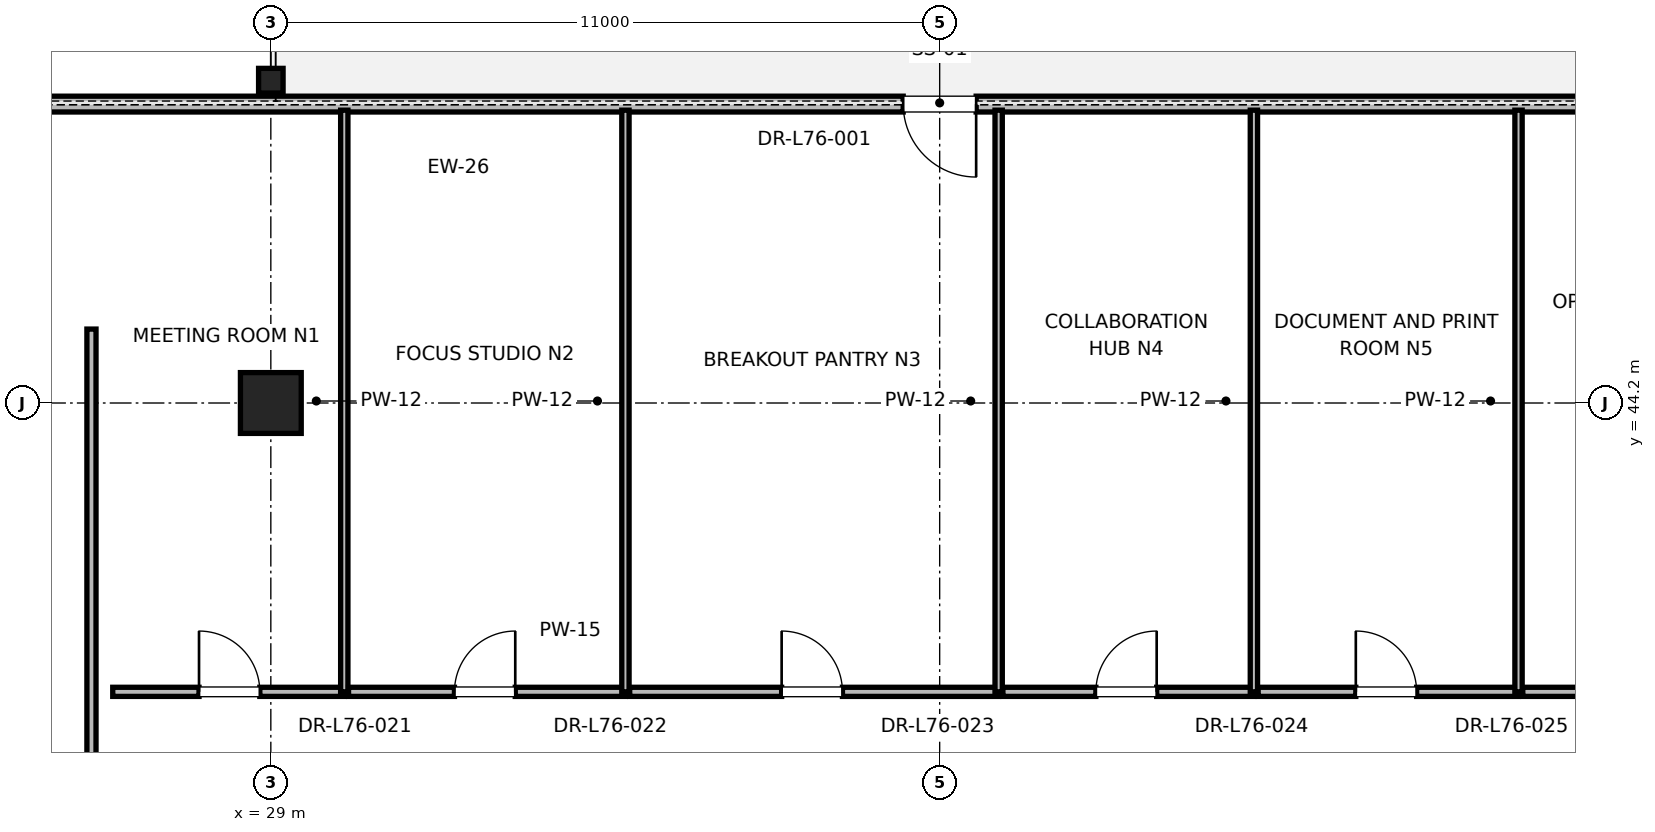
"""IFC4 building model, lengths in metres.
Left out: names, types, materials, properties, quantities, classifications, styles, units other than length and angle.
Written with IfcOpenShell. Run it as: python <this file> out.ifc"""

import sys

from ifc_helpers import new_model, si_unit, direction, frame, frame_2d, origin, origin_2d, place, context, subcontext, project, spatial, rectangle, i_section, extrude, element, fill, save


model = new_model("IFC4")
c1 = context("Model", 3, precision=1e-05, world=origin(), true_north=direction((0.0, 1.0)))
c2 = subcontext(c1, "Body", "Model", "MODEL_VIEW")
j1 = project(units=[si_unit("LENGTHUNIT", "METRE"), si_unit("PLANEANGLEUNIT", "RADIAN")], contexts=[c1])
p1 = place(None, origin())
s1 = spatial("IfcSite", under=j1, at=p1, CompositionType="ELEMENT")
p2 = place(p1, origin())
s2 = spatial("IfcBuilding", under=s1, at=p2, CompositionType="ELEMENT")
p3 = place(p2, frame((0.0, 0.0, 326.8)))
s3 = spatial("IfcBuildingStorey", under=s2, at=p3, CompositionType="ELEMENT", Elevation=326.8)
p4 = place(p3, frame((29.0, 44.2, 0.0), z_axis=(0.0, 0.0, 1.0), x_axis=(1.0, 0.0, 0.0)))
e1 = element("IfcColumn", 1, at=p4, inside=s3, PredefinedType="COLUMN", context=c2, shape_type="SweptSolid", body=[
    extrude(rectangle(XDim=1.0, YDim=1.0, at=origin_2d()), origin(), (0.0, 0.0, 1.0), 4.0),
])
p5 = place(p3, frame((29.0, 49.5, 0.0), z_axis=(0.0, 0.0, 1.0), x_axis=(1.0, 0.0, 0.0)))
e2 = element("IfcColumn", 2, at=p5, inside=s3, PredefinedType="COLUMN", context=c2, shape_type="SweptSolid", body=[
    extrude(i_section(OverallWidth=0.403, OverallDepth=0.406, WebThickness=0.027, FlangeThickness=0.043, FilletRadius=0.015, at=origin_2d()), origin(), (0.0, 0.0, 1.0), 4.0),
])
p6 = place(p3, frame((61.031, 49.116, 0.0), z_axis=(0.0, 0.0, 1.0), x_axis=(-1.0, 0.0, 0.0)))
e3 = element("IfcWall", 3, at=p6, inside=s3, PredefinedType="PARAPET", context=c2, shape_type="SweptSolid", body=[
    extrude(rectangle(XDim=42.063, YDim=0.26, at=frame_2d((21.031, 0.0))), origin(), (0.0, 0.0, 1.0), 3.196),
])
p7 = place(p6, frame((4.2, 0.0, 0.85)))
e4 = element("IfcOpeningElement", 4, at=p7, cuts=e3, PredefinedType="OPENING", context=c2, shape_type="SweptSolid", body=[
    extrude(rectangle(XDim=1.6, YDim=2.1, at=frame_2d((0.8, 1.05))), frame((0.0, 0.13, 0.0), z_axis=(0.0, -1.0, 0.0), x_axis=(1.0, 0.0, 0.0)), (0.0, 0.0, 1.0), 0.26),
])
p8 = place(p6, frame((20.431, 0.0, 0.0)))
e5 = element("IfcOpeningElement", 5, at=p8, cuts=e3, PredefinedType="OPENING", context=c2, shape_type="SweptSolid", body=[
    extrude(rectangle(XDim=1.2, YDim=2.2, at=frame_2d((0.6, 1.1))), frame((0.0, 0.13, 0.0), z_axis=(0.0, -1.0, 0.0), x_axis=(1.0, 0.0, 0.0)), (0.0, 0.0, 1.0), 0.26),
])
p9 = place(p6, frame((36.263, 0.0, 0.85)))
e6 = element("IfcOpeningElement", 6, at=p9, cuts=e3, PredefinedType="OPENING", context=c2, shape_type="SweptSolid", body=[
    extrude(rectangle(XDim=1.6, YDim=2.1, at=frame_2d((0.8, 1.05))), frame((0.0, 0.13, 0.0), z_axis=(0.0, -1.0, 0.0), x_axis=(1.0, 0.0, 0.0)), (0.0, 0.0, 1.0), 0.26),
])
p10 = place(p3, frame((26.4, 39.45, 0.0), z_axis=(0.0, 0.0, 1.0), x_axis=(1.0, 0.0, 0.0)))
e7 = element("IfcWall", 7, at=p10, inside=s3, PredefinedType="PARTITIONING", context=c2, shape_type="SweptSolid", body=[
    extrude(rectangle(XDim=3.808, YDim=0.15, at=frame_2d((1.904, 0.0))), origin(), (0.0, 0.0, 1.0), 2.85),
])
p11 = place(p10, frame((1.419, 0.0, 0.0)))
e8 = element("IfcOpeningElement", 8, at=p11, cuts=e7, PredefinedType="OPENING", context=c2, shape_type="SweptSolid", body=[
    extrude(rectangle(XDim=1.0, YDim=2.15, at=frame_2d((0.5, 1.075))), frame((0.0, 0.075, 0.0), z_axis=(0.0, -1.0, 0.0), x_axis=(1.0, 0.0, 0.0)), (0.0, 0.0, 1.0), 0.15),
])
p12 = place(p3, frame((30.208, 39.45, 0.0), z_axis=(0.0, 0.0, 1.0), x_axis=(0.0, 1.0, 0.0)))
e9 = element("IfcWall", 9, at=p12, inside=s3, PredefinedType="PARTITIONING", context=c2, shape_type="SweptSolid", body=[
    extrude(rectangle(XDim=9.566, YDim=0.12, at=frame_2d((4.783, 0.0))), origin(), (0.0, 0.0, 1.0), 2.415),
])
p13 = place(p3, frame((30.278, 39.45, 0.0), z_axis=(0.0, 0.0, 1.0), x_axis=(1.0, 0.0, 0.0)))
e10 = element("IfcWall", 10, at=p13, inside=s3, PredefinedType="PARTITIONING", context=c2, shape_type="SweptSolid", body=[
    extrude(rectangle(XDim=4.554, YDim=0.15, at=frame_2d((2.277, 0.0))), origin(), (0.0, 0.0, 1.0), 2.85),
])
p14 = place(p13, frame((1.742, 0.0, 0.0)))
e11 = element("IfcOpeningElement", 11, at=p14, cuts=e10, PredefinedType="OPENING", context=c2, shape_type="SweptSolid", body=[
    extrude(rectangle(XDim=1.0, YDim=2.15, at=frame_2d((0.5, 1.075))), frame((0.0, 0.075, 0.0), z_axis=(0.0, -1.0, 0.0), x_axis=(1.0, 0.0, 0.0)), (0.0, 0.0, 1.0), 0.15),
])
p15 = place(p3, frame((34.832, 39.45, 0.0), z_axis=(0.0, 0.0, 1.0), x_axis=(0.0, 1.0, 0.0)))
e12 = element("IfcWall", 12, at=p15, inside=s3, PredefinedType="PARTITIONING", context=c2, shape_type="SweptSolid", body=[
    extrude(rectangle(XDim=9.566, YDim=0.12, at=frame_2d((4.783, 0.0))), origin(), (0.0, 0.0, 1.0), 2.415),
])
p16 = place(p3, frame((34.902, 39.45, 0.0), z_axis=(0.0, 0.0, 1.0), x_axis=(1.0, 0.0, 0.0)))
e13 = element("IfcWall", 13, at=p16, inside=s3, PredefinedType="PARTITIONING", context=c2, shape_type="SweptSolid", body=[
    extrude(rectangle(XDim=6.068, YDim=0.15, at=frame_2d((3.034, 0.0))), origin(), (0.0, 0.0, 1.0), 2.85),
])
p17 = place(p16, frame((2.499, 0.0, 0.0)))
e14 = element("IfcOpeningElement", 14, at=p17, cuts=e13, PredefinedType="OPENING", context=c2, shape_type="SweptSolid", body=[
    extrude(rectangle(XDim=1.0, YDim=2.15, at=frame_2d((0.5, 1.075))), frame((0.0, 0.075, 0.0), z_axis=(0.0, -1.0, 0.0), x_axis=(1.0, 0.0, 0.0)), (0.0, 0.0, 1.0), 0.15),
])
p18 = place(p3, frame((40.97, 39.45, 0.0), z_axis=(0.0, 0.0, 1.0), x_axis=(0.0, 1.0, 0.0)))
e15 = element("IfcWall", 15, at=p18, inside=s3, PredefinedType="PARTITIONING", context=c2, shape_type="SweptSolid", body=[
    extrude(rectangle(XDim=9.566, YDim=0.12, at=frame_2d((4.783, 0.0))), origin(), (0.0, 0.0, 1.0), 2.415),
])
p19 = place(p3, frame((41.04, 39.45, 0.0), z_axis=(0.0, 0.0, 1.0), x_axis=(1.0, 0.0, 0.0)))
e16 = element("IfcWall", 16, at=p19, inside=s3, PredefinedType="PARTITIONING", context=c2, shape_type="SweptSolid", body=[
    extrude(rectangle(XDim=4.128, YDim=0.15, at=frame_2d((2.064, 0.0))), origin(), (0.0, 0.0, 1.0), 2.85),
])
p20 = place(p19, frame((1.529, 0.0, 0.0)))
e17 = element("IfcOpeningElement", 17, at=p20, cuts=e16, PredefinedType="OPENING", context=c2, shape_type="SweptSolid", body=[
    extrude(rectangle(XDim=1.0, YDim=2.15, at=frame_2d((0.5, 1.075))), frame((0.0, 0.075, 0.0), z_axis=(0.0, -1.0, 0.0), x_axis=(1.0, 0.0, 0.0)), (0.0, 0.0, 1.0), 0.15),
])
p21 = place(p3, frame((45.168, 39.45, 0.0), z_axis=(0.0, 0.0, 1.0), x_axis=(0.0, 1.0, 0.0)))
e18 = element("IfcWall", 18, at=p21, inside=s3, PredefinedType="PARTITIONING", context=c2, shape_type="SweptSolid", body=[
    extrude(rectangle(XDim=9.566, YDim=0.12, at=frame_2d((4.783, 0.0))), origin(), (0.0, 0.0, 1.0), 2.415),
])
p22 = place(p3, frame((45.238, 39.45, 0.0), z_axis=(0.0, 0.0, 1.0), x_axis=(1.0, 0.0, 0.0)))
e19 = element("IfcWall", 19, at=p22, inside=s3, PredefinedType="PARTITIONING", context=c2, shape_type="SweptSolid", body=[
    extrude(rectangle(XDim=4.282, YDim=0.15, at=frame_2d((2.141, 0.0))), origin(), (0.0, 0.0, 1.0), 2.85),
])
p23 = place(p22, frame((1.606, 0.0, 0.0)))
e20 = element("IfcOpeningElement", 20, at=p23, cuts=e19, PredefinedType="OPENING", context=c2, shape_type="SweptSolid", body=[
    extrude(rectangle(XDim=1.0, YDim=2.15, at=frame_2d((0.5, 1.075))), frame((0.0, 0.075, 0.0), z_axis=(0.0, -1.0, 0.0), x_axis=(1.0, 0.0, 0.0)), (0.0, 0.0, 1.0), 0.15),
])
p24 = place(p3, frame((49.52, 39.45, 0.0), z_axis=(0.0, 0.0, 1.0), x_axis=(0.0, 1.0, 0.0)))
e21 = element("IfcWall", 21, at=p24, inside=s3, PredefinedType="PARTITIONING", context=c2, shape_type="SweptSolid", body=[
    extrude(rectangle(XDim=9.566, YDim=0.12, at=frame_2d((4.783, 0.0))), origin(), (0.0, 0.0, 1.0), 2.415),
])
p25 = place(p3, frame((49.59, 39.45, 0.0), z_axis=(0.0, 0.0, 1.0), x_axis=(1.0, 0.0, 0.0)))
e22 = element("IfcWall", 22, at=p25, inside=s3, PredefinedType="PARTITIONING", context=c2, shape_type="SweptSolid", body=[
    extrude(rectangle(XDim=4.01, YDim=0.15, at=frame_2d((2.005, 0.0))), origin(), (0.0, 0.0, 1.0), 2.85),
])
p26 = place(p25, frame((1.455, 0.0, 0.0)))
e23 = element("IfcOpeningElement", 23, at=p26, cuts=e22, PredefinedType="OPENING", context=c2, shape_type="SweptSolid", body=[
    extrude(rectangle(XDim=1.0, YDim=2.15, at=frame_2d((0.5, 1.075))), frame((0.0, 0.075, 0.0), z_axis=(0.0, -1.0, 0.0), x_axis=(1.0, 0.0, 0.0)), (0.0, 0.0, 1.0), 0.15),
])
p27 = place(p3, frame((26.05, 34.736, 0.0), z_axis=(0.0, 0.0, 1.0), x_axis=(0.0, 1.0, 0.0)))
e24 = element("IfcWall", 24, at=p27, inside=s3, PredefinedType="PARTITIONING", context=c2, shape_type="SweptSolid", body=[
    extrude(rectangle(XDim=10.679, YDim=0.15, at=frame_2d((5.34, 0.0))), origin(), (0.0, 0.0, 1.0), 2.85),
])
p28 = place(p27, frame((0.332, 0.0, 0.0)))
e25 = element("IfcOpeningElement", 25, at=p28, cuts=e24, PredefinedType="OPENING", context=c2, shape_type="SweptSolid", body=[
    extrude(rectangle(XDim=1.0, YDim=2.15, at=frame_2d((0.5, 1.075))), frame((0.0, 0.075, 0.0), z_axis=(0.0, -1.0, 0.0), x_axis=(1.0, 0.0, 0.0)), (0.0, 0.0, 1.0), 0.15),
])
p29 = place(p8, origin())
e26 = element("IfcDoor", 26, at=p29, inside=s3, OperationType="SINGLE_SWING_LEFT", PredefinedType="DOOR", context=c2, shape_type="SweptSolid", body=[
    extrude(rectangle(XDim=1.2, YDim=2.2, at=frame_2d((0.6, 1.1))), frame((0.0, 0.025, 0.0), z_axis=(0.0, -1.0, 0.0), x_axis=(1.0, 0.0, 0.0)), (0.0, 0.0, 1.0), 0.05),
])
fill(e5, e26)
p30 = place(p11, origin())
e27 = element("IfcDoor", 27, at=p30, inside=s3, OperationType="SINGLE_SWING_LEFT", PredefinedType="DOOR", context=c2, shape_type="SweptSolid", body=[
    extrude(rectangle(XDim=1.0, YDim=2.15, at=frame_2d((0.5, 1.075))), frame((0.0, 0.025, 0.0), z_axis=(0.0, -1.0, 0.0), x_axis=(1.0, 0.0, 0.0)), (0.0, 0.0, 1.0), 0.05),
])
fill(e8, e27)
p31 = place(p14, origin())
e28 = element("IfcDoor", 28, at=p31, inside=s3, OperationType="SINGLE_SWING_RIGHT", PredefinedType="DOOR", context=c2, shape_type="SweptSolid", body=[
    extrude(rectangle(XDim=1.0, YDim=2.15, at=frame_2d((0.5, 1.075))), frame((0.0, 0.025, 0.0), z_axis=(0.0, -1.0, 0.0), x_axis=(1.0, 0.0, 0.0)), (0.0, 0.0, 1.0), 0.05),
])
fill(e11, e28)
p32 = place(p17, origin())
e29 = element("IfcDoor", 29, at=p32, inside=s3, OperationType="SINGLE_SWING_LEFT", PredefinedType="DOOR", context=c2, shape_type="SweptSolid", body=[
    extrude(rectangle(XDim=1.0, YDim=2.15, at=frame_2d((0.5, 1.075))), frame((0.0, 0.025, 0.0), z_axis=(0.0, -1.0, 0.0), x_axis=(1.0, 0.0, 0.0)), (0.0, 0.0, 1.0), 0.05),
])
fill(e14, e29)
p33 = place(p20, origin())
e30 = element("IfcDoor", 30, at=p33, inside=s3, OperationType="SINGLE_SWING_RIGHT", PredefinedType="DOOR", context=c2, shape_type="SweptSolid", body=[
    extrude(rectangle(XDim=1.0, YDim=2.15, at=frame_2d((0.5, 1.075))), frame((0.0, 0.025, 0.0), z_axis=(0.0, -1.0, 0.0), x_axis=(1.0, 0.0, 0.0)), (0.0, 0.0, 1.0), 0.05),
])
fill(e17, e30)
p34 = place(p23, origin())
e31 = element("IfcDoor", 31, at=p34, inside=s3, OperationType="SINGLE_SWING_LEFT", PredefinedType="DOOR", context=c2, shape_type="SweptSolid", body=[
    extrude(rectangle(XDim=1.0, YDim=2.15, at=frame_2d((0.5, 1.075))), frame((0.0, 0.025, 0.0), z_axis=(0.0, -1.0, 0.0), x_axis=(1.0, 0.0, 0.0)), (0.0, 0.0, 1.0), 0.05),
])
fill(e20, e31)
save(model, sys.argv[1])
